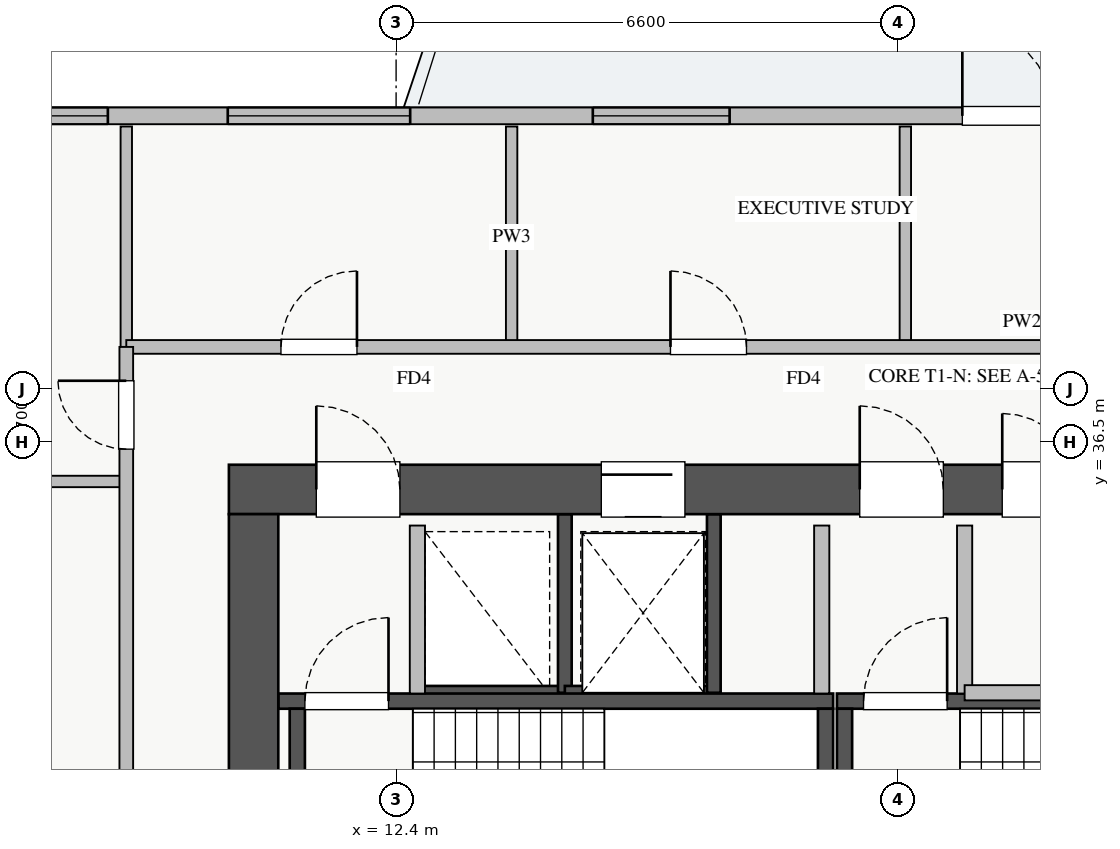
"""IFC4 building model, lengths in metres.
Left out: names, types, materials, properties, quantities, classifications, styles, units other than length and angle.
Written with IfcOpenShell. Run it as: python <this file> out.ifc"""

import sys

from ifc_helpers import new_model, si_unit, direction, frame, frame_2d, origin, place, context, subcontext, project, spatial, rectangle, extrude, source, transform, mapped, element, fill, save


model = new_model("IFC4")
c1 = context("Model", 3, precision=1e-05, world=origin(), true_north=direction((0.0, 1.0)))
c2 = subcontext(c1, "Body", "Model", "MODEL_VIEW")
j1 = project(units=[si_unit("LENGTHUNIT", "METRE"), si_unit("PLANEANGLEUNIT", "RADIAN")], contexts=[c1])
p1 = place(None, origin())
s1 = spatial("IfcSite", under=j1, at=p1, CompositionType="ELEMENT")
p2 = place(p1, origin())
s2 = spatial("IfcBuilding", under=s1, at=p2, CompositionType="ELEMENT")
p3 = place(p2, frame((0.0, 0.0, 116.5)))
s3 = spatial("IfcBuildingStorey", under=s2, at=p3, CompositionType="ELEMENT", Elevation=116.5)
p4 = place(p3, frame((12.68, 33.2, 0.0), z_axis=(0.0, 0.0, 1.0), x_axis=(1.0, 0.0, 0.0)))
e1 = element("IfcWall", 1, at=p4, inside=s3, PredefinedType="SHEAR", context=c2, shape_type="SweptSolid", body=[
    extrude(rectangle(XDim=1.94, YDim=0.18, at=frame_2d((0.97, 0.0))), origin(), (0.0, 0.0, 1.0), 3.07),
])
p5 = place(p3, frame((14.62, 33.2, 0.0), z_axis=(0.0, 0.0, 1.0), x_axis=(0.0, 1.0, 0.0)))
e2 = element("IfcWall", 2, at=p5, inside=s3, PredefinedType="SHEAR", context=c2, shape_type="SweptSolid", body=[
    extrude(rectangle(XDim=2.35, YDim=0.18, at=frame_2d((1.175, 0.0))), origin(), (0.0, 0.0, 1.0), 3.07),
])
p6 = place(p3, frame((14.62, 33.2, 0.0), z_axis=(0.0, 0.0, 1.0), x_axis=(1.0, 0.0, 0.0)))
e3 = element("IfcWall", 3, at=p6, inside=s3, PredefinedType="SHEAR", context=c2, shape_type="SweptSolid", body=[
    extrude(rectangle(XDim=1.96, YDim=0.18, at=frame_2d((0.98, 0.0))), origin(), (0.0, 0.0, 1.0), 3.07),
])
p7 = place(p3, frame((16.58, 33.2, 0.0), z_axis=(0.0, 0.0, 1.0), x_axis=(0.0, 1.0, 0.0)))
e4 = element("IfcWall", 4, at=p7, inside=s3, PredefinedType="SHEAR", context=c2, shape_type="SweptSolid", body=[
    extrude(rectangle(XDim=2.35, YDim=0.18, at=frame_2d((1.175, 0.0))), origin(), (0.0, 0.0, 1.0), 3.07),
])
p8 = place(p3, frame((10.85, 33.09, 0.0), z_axis=(0.0, 0.0, 1.0), x_axis=(1.0, 0.0, 0.0)))
e5 = element("IfcWall", 5, at=p8, inside=s3, PredefinedType="SHEAR", context=c2, shape_type="SweptSolid", body=[
    extrude(rectangle(XDim=7.3, YDim=0.2, at=frame_2d((3.65, 0.0))), origin(), (0.0, 0.0, 1.0), 3.25),
])
p9 = place(p8, frame((0.35, 0.0, 0.0)))
e6 = element("IfcOpeningElement", 6, at=p9, cuts=e5, PredefinedType="OPENING", context=c2, shape_type="SweptSolid", body=[
    extrude(rectangle(XDim=1.1, YDim=2.05, at=frame_2d((0.55, 1.025))), frame((0.0, 0.11, 0.0), z_axis=(0.0, -1.0, 0.0), x_axis=(1.0, 0.0, 0.0)), (0.0, 0.0, 1.0), 0.22),
])
for number, where, z_axis, x_axis in (
    (7, (11.1, 30.05, 0.0), (0.0, 0.0, 1.0), (0.0, 1.0, 0.0)),
    (8, (18.05, 30.05, 0.0), (0.0, 0.0, 1.0), (0.0, 1.0, 0.0)),
):
    element("IfcWall", number, at=place(p3, frame(where, z_axis=z_axis, x_axis=x_axis)), inside=s3, PredefinedType="SHEAR", context=c2, shape_type="SweptSolid", body=[
        extrude(rectangle(XDim=2.94, YDim=0.2, at=frame_2d((1.47, 0.0))), origin(), (0.0, 0.0, 1.0), 3.25),
    ])
p10 = place(p3, frame((18.2, 33.09, 0.0), z_axis=(0.0, 0.0, 1.0), x_axis=(1.0, 0.0, 0.0)))
e9 = element("IfcWall", 9, at=p10, inside=s3, PredefinedType="SHEAR", context=c2, shape_type="SweptSolid", body=[
    extrude(rectangle(XDim=7.15, YDim=0.2, at=frame_2d((3.575, 0.0))), origin(), (0.0, 0.0, 1.0), 3.25),
])
p11 = place(p10, frame((0.35, 0.0, 0.0)))
e10 = element("IfcOpeningElement", 10, at=p11, cuts=e9, PredefinedType="OPENING", context=c2, shape_type="SweptSolid", body=[
    extrude(rectangle(XDim=1.1, YDim=2.05, at=frame_2d((0.55, 1.025))), frame((0.0, 0.11, 0.0), z_axis=(0.0, -1.0, 0.0), x_axis=(1.0, 0.0, 0.0)), (0.0, 0.0, 1.0), 0.22),
])
p12 = place(p3, frame((18.3, 30.05, 0.0), z_axis=(0.0, 0.0, 1.0), x_axis=(0.0, 1.0, 0.0)))
e11 = element("IfcWall", 11, at=p12, inside=s3, PredefinedType="SHEAR", context=c2, shape_type="SweptSolid", body=[
    extrude(rectangle(XDim=2.94, YDim=0.2, at=frame_2d((1.47, 0.0))), origin(), (0.0, 0.0, 1.0), 3.25),
])
p13 = place(p3, frame((10.2, 35.875, 0.0), z_axis=(0.0, 0.0, 1.0), x_axis=(1.0, 0.0, 0.0)))
e12 = element("IfcWall", 12, at=p13, inside=s3, PredefinedType="SHEAR", context=c2, shape_type="SweptSolid", body=[
    extrude(rectangle(XDim=17.6, YDim=0.65, at=frame_2d((8.8, 0.0))), origin(), (0.0, 0.0, 1.0), 3.25),
])
p14 = place(p13, frame((1.15, 0.0, 0.0)))
e13 = element("IfcOpeningElement", 13, at=p14, cuts=e12, PredefinedType="OPENING", context=c2, shape_type="SweptSolid", body=[
    extrude(rectangle(XDim=1.1, YDim=2.05, at=frame_2d((0.55, 1.025))), frame((0.0, 0.335, 0.0), z_axis=(0.0, -1.0, 0.0), x_axis=(1.0, 0.0, 0.0)), (0.0, 0.0, 1.0), 0.67),
])
p15 = place(p13, frame((8.3, 0.0, 0.0)))
e14 = element("IfcOpeningElement", 14, at=p15, cuts=e12, PredefinedType="OPENING", context=c2, shape_type="SweptSolid", body=[
    extrude(rectangle(XDim=1.1, YDim=2.05, at=frame_2d((0.55, 1.025))), frame((0.0, 0.335, 0.0), z_axis=(0.0, -1.0, 0.0), x_axis=(1.0, 0.0, 0.0)), (0.0, 0.0, 1.0), 0.67),
])
p16 = place(p13, frame((4.9, 0.0, 0.0)))
e15 = element("IfcOpeningElement", 15, at=p16, cuts=e12, PredefinedType="OPENING", context=c2, shape_type="SweptSolid", body=[
    extrude(rectangle(XDim=1.1, YDim=2.05, at=frame_2d((0.55, 1.025))), frame((0.0, 0.335, 0.0), z_axis=(0.0, -1.0, 0.0), x_axis=(1.0, 0.0, 0.0)), (0.0, 0.0, 1.0), 0.67),
])
p17 = place(p13, frame((14.74, 0.0, 0.0)))
e16 = element("IfcOpeningElement", 16, at=p17, cuts=e12, PredefinedType="OPENING", context=c2, shape_type="SweptSolid", body=[
    extrude(rectangle(XDim=1.0, YDim=2.05, at=frame_2d((0.5, 1.025))), frame((0.0, 0.335, 0.0), z_axis=(0.0, -1.0, 0.0), x_axis=(1.0, 0.0, 0.0)), (0.0, 0.0, 1.0), 0.67),
])
p18 = place(p13, frame((10.175, 0.0, 0.0)))
e17 = element("IfcOpeningElement", 17, at=p18, cuts=e12, PredefinedType="OPENING", context=c2, shape_type="SweptSolid", body=[
    extrude(rectangle(XDim=1.0, YDim=2.05, at=frame_2d((0.5, 1.025))), frame((0.0, 0.335, 0.0), z_axis=(0.0, -1.0, 0.0), x_axis=(1.0, 0.0, 0.0)), (0.0, 0.0, 1.0), 0.67),
])
p19 = place(p13, frame((12.625, 0.0, 0.0)))
e18 = element("IfcOpeningElement", 18, at=p19, cuts=e12, PredefinedType="OPENING", context=c2, shape_type="SweptSolid", body=[
    extrude(rectangle(XDim=1.0, YDim=2.05, at=frame_2d((0.5, 1.025))), frame((0.0, 0.335, 0.0), z_axis=(0.0, -1.0, 0.0), x_axis=(1.0, 0.0, 0.0)), (0.0, 0.0, 1.0), 0.67),
])
p20 = place(p3, frame((10.525, 29.65, 0.0), z_axis=(0.0, 0.0, 1.0), x_axis=(0.0, 1.0, 0.0)))
e19 = element("IfcWall", 19, at=p20, inside=s3, PredefinedType="SHEAR", context=c2, shape_type="SweptSolid", body=[
    extrude(rectangle(XDim=5.9, YDim=0.65, at=frame_2d((2.95, 0.0))), origin(), (0.0, 0.0, 1.0), 3.25),
])
p21 = place(p3, frame((6.55, 40.79, 0.0), z_axis=(0.0, 0.0, 1.0), x_axis=(1.0, 0.0, 0.0)))
e20 = element("IfcWall", 20, at=p21, inside=s3, PredefinedType="STANDARD", context=c2, shape_type="SweptSolid", body=[
    extrude(rectangle(XDim=24.9, YDim=0.22, at=frame_2d((12.45, 0.0))), origin(), (0.0, 0.0, 1.0), 2.61),
])
p22 = place(p21, frame((13.3, 0.0, 0.0)))
e21 = element("IfcOpeningElement", 21, at=p22, cuts=e20, PredefinedType="OPENING", context=c2, shape_type="SweptSolid", body=[
    extrude(rectangle(XDim=1.2, YDim=2.1, at=frame_2d((0.6, 1.05))), frame((0.0, 0.12, 0.0), z_axis=(0.0, -1.0, 0.0), x_axis=(1.0, 0.0, 0.0)), (0.0, 0.0, 1.0), 0.24),
])
p23 = place(p21, frame((3.635, 0.0, 0.9)))
e22 = element("IfcOpeningElement", 22, at=p23, cuts=e20, PredefinedType="OPENING", context=c2, shape_type="SweptSolid", body=[
    extrude(rectangle(XDim=2.4, YDim=1.5, at=frame_2d((1.2, 0.75))), frame((0.0, 0.12, 0.0), z_axis=(0.0, -1.0, 0.0), x_axis=(1.0, 0.0, 0.0)), (0.0, 0.0, 1.0), 0.24),
])
p24 = place(p21, frame((8.438, 0.0, 0.9)))
e23 = element("IfcOpeningElement", 23, at=p24, cuts=e20, PredefinedType="OPENING", context=c2, shape_type="SweptSolid", body=[
    extrude(rectangle(XDim=1.8, YDim=1.45, at=frame_2d((0.9, 0.725))), frame((0.0, 0.12, 0.0), z_axis=(0.0, -1.0, 0.0), x_axis=(1.0, 0.0, 0.0)), (0.0, 0.0, 1.0), 0.24),
])
p25 = place(p21, frame((14.813, 0.0, 0.9)))
e24 = element("IfcOpeningElement", 24, at=p25, cuts=e20, PredefinedType="OPENING", context=c2, shape_type="SweptSolid", body=[
    extrude(rectangle(XDim=1.5, YDim=1.45, at=frame_2d((0.75, 0.725))), frame((0.0, 0.12, 0.0), z_axis=(0.0, -1.0, 0.0), x_axis=(1.0, 0.0, 0.0)), (0.0, 0.0, 1.0), 0.24),
])
p26 = place(p21, frame((20.738, 0.0, 0.9)))
e25 = element("IfcOpeningElement", 25, at=p26, cuts=e20, PredefinedType="OPENING", context=c2, shape_type="SweptSolid", body=[
    extrude(rectangle(XDim=2.1, YDim=1.48, at=frame_2d((1.05, 0.74))), frame((0.0, 0.12, 0.0), z_axis=(0.0, -1.0, 0.0), x_axis=(1.0, 0.0, 0.0)), (0.0, 0.0, 1.0), 0.24),
])
p27 = place(p21, frame((0.258, 0.0, 0.9)))
e26 = element("IfcOpeningElement", 26, at=p27, cuts=e20, PredefinedType="OPENING", context=c2, shape_type="SweptSolid", body=[
    extrude(rectangle(XDim=1.8, YDim=1.5, at=frame_2d((0.9, 0.75))), frame((0.0, 0.12, 0.0), z_axis=(0.0, -1.0, 0.0), x_axis=(1.0, 0.0, 0.0)), (0.0, 0.0, 1.0), 0.24),
])
for number, where, z_axis, x_axis in (
    (27, (12.68, 33.19, 0.0), (0.0, 0.0, 1.0), (0.0, 1.0, 0.0)),
    (28, (18.0, 33.19, 0.0), (0.0, 0.0, 1.0), (0.0, 1.0, 0.0)),
    (29, (19.88, 33.19, 0.0), (0.0, 0.0, 1.0), (0.0, 1.0, 0.0)),
):
    element("IfcWall", number, at=place(p3, frame(where, z_axis=z_axis, x_axis=x_axis)), inside=s3, PredefinedType="PARTITIONING", context=c2, shape_type="SweptSolid", body=[
        extrude(rectangle(XDim=2.21, YDim=0.2, at=frame_2d((1.105, 0.0))), origin(), (0.0, 0.0, 1.0), 3.07),
    ])
p28 = place(p3, frame((19.88, 33.2, 0.0), z_axis=(0.0, 0.0, 1.0), x_axis=(1.0, 0.0, 0.0)))
e30 = element("IfcWall", 30, at=p28, inside=s3, PredefinedType="PARTITIONING", context=c2, shape_type="SweptSolid", body=[
    extrude(rectangle(XDim=1.87, YDim=0.2, at=frame_2d((0.935, 0.0))), origin(), (0.0, 0.0, 1.0), 3.07),
])
p29 = place(p3, frame((13.92, 37.75, 0.0), z_axis=(0.0, 0.0, 1.0), x_axis=(0.0, 1.0, 0.0)))
e31 = element("IfcWall", 31, at=p29, inside=s3, PredefinedType="PARTITIONING", context=c2, shape_type="SweptSolid", body=[
    extrude(rectangle(XDim=2.9, YDim=0.15, at=frame_2d((1.45, 0.0))), origin(), (0.0, 0.0, 1.0), 3.07),
])
p30 = place(p3, frame((19.1, 37.75, 0.0), z_axis=(0.0, 0.0, 1.0), x_axis=(0.0, 1.0, 0.0)))
e32 = element("IfcWall", 32, at=p30, inside=s3, PredefinedType="PARTITIONING", context=c2, shape_type="SweptSolid", body=[
    extrude(rectangle(XDim=2.9, YDim=0.15, at=frame_2d((1.45, 0.0))), origin(), (0.0, 0.0, 1.0), 2.815),
])
p31 = place(p3, frame((8.85, 37.75, 0.0), z_axis=(0.0, 0.0, 1.0), x_axis=(0.0, 1.0, 0.0)))
e33 = element("IfcWall", 33, at=p31, inside=s3, PredefinedType="PARTITIONING", context=c2, shape_type="SweptSolid", body=[
    extrude(rectangle(XDim=2.9, YDim=0.15, at=frame_2d((1.45, 0.0))), origin(), (0.0, 0.0, 1.0), 3.07),
])
p32 = place(p3, frame((8.85, 37.75, 0.0), z_axis=(0.0, 0.0, 1.0), x_axis=(1.0, 0.0, 0.0)))
e34 = element("IfcWall", 34, at=p32, inside=s3, PredefinedType="PARTITIONING", context=c2, shape_type="SweptSolid", body=[
    extrude(rectangle(XDim=23.57, YDim=0.18, at=frame_2d((11.785, 0.0))), origin(), (0.0, 0.0, 1.0), 3.07),
])
p33 = place(p32, frame((2.035, 0.0, 0.0)))
e35 = element("IfcOpeningElement", 35, at=p33, cuts=e34, PredefinedType="OPENING", context=c2, shape_type="SweptSolid", body=[
    extrude(rectangle(XDim=1.0, YDim=2.05, at=frame_2d((0.5, 1.025))), frame((0.0, 0.1, 0.0), z_axis=(0.0, -1.0, 0.0), x_axis=(1.0, 0.0, 0.0)), (0.0, 0.0, 1.0), 0.2),
])
p34 = place(p32, frame((7.16, 0.0, 0.0)))
e36 = element("IfcOpeningElement", 36, at=p34, cuts=e34, PredefinedType="OPENING", context=c2, shape_type="SweptSolid", body=[
    extrude(rectangle(XDim=1.0, YDim=2.05, at=frame_2d((0.5, 1.025))), frame((0.0, 0.1, 0.0), z_axis=(0.0, -1.0, 0.0), x_axis=(1.0, 0.0, 0.0)), (0.0, 0.0, 1.0), 0.2),
])
p35 = place(p32, frame((13.3, 0.0, 0.0)))
e37 = element("IfcOpeningElement", 37, at=p35, cuts=e34, PredefinedType="OPENING", context=c2, shape_type="SweptSolid", body=[
    extrude(rectangle(XDim=1.0, YDim=2.05, at=frame_2d((0.5, 1.025))), frame((0.0, 0.1, 0.0), z_axis=(0.0, -1.0, 0.0), x_axis=(1.0, 0.0, 0.0)), (0.0, 0.0, 1.0), 0.2),
])
p36 = place(p32, frame((19.74, 0.0, 0.0)))
e38 = element("IfcOpeningElement", 38, at=p36, cuts=e34, PredefinedType="OPENING", context=c2, shape_type="SweptSolid", body=[
    extrude(rectangle(XDim=1.0, YDim=2.05, at=frame_2d((0.5, 1.025))), frame((0.0, 0.1, 0.0), z_axis=(0.0, -1.0, 0.0), x_axis=(1.0, 0.0, 0.0)), (0.0, 0.0, 1.0), 0.2),
])
p37 = place(p3, frame((1.35, 35.98, 0.0), z_axis=(0.0, 0.0, 1.0), x_axis=(1.0, 0.0, 0.0)))
e39 = element("IfcWall", 39, at=p37, inside=s3, PredefinedType="PARTITIONING", context=c2, shape_type="SweptSolid", body=[
    extrude(rectangle(XDim=7.5, YDim=0.15, at=frame_2d((3.75, 0.0))), origin(), (0.0, 0.0, 1.0), 3.07),
])
p38 = place(p3, frame((8.85, 8.25, 0.0), z_axis=(0.0, 0.0, 1.0), x_axis=(0.0, 1.0, 0.0)))
e40 = element("IfcWall", 40, at=p38, inside=s3, PredefinedType="PARTITIONING", context=c2, shape_type="SweptSolid", body=[
    extrude(rectangle(XDim=29.5, YDim=0.18, at=frame_2d((14.75, 0.0))), origin(), (0.0, 0.0, 1.0), 3.07),
])
p39 = place(p38, frame((28.155, 0.0, 0.0)))
e41 = element("IfcOpeningElement", 41, at=p39, cuts=e40, PredefinedType="OPENING", context=c2, shape_type="SweptSolid", body=[
    extrude(rectangle(XDim=0.9, YDim=2.05, at=frame_2d((0.45, 1.025))), frame((0.0, 0.1, 0.0), z_axis=(0.0, -1.0, 0.0), x_axis=(1.0, 0.0, 0.0)), (0.0, 0.0, 1.0), 0.2),
])
p40 = place(p38, frame((0.27, 0.0, 0.0)))
e42 = element("IfcOpeningElement", 42, at=p40, cuts=e40, PredefinedType="OPENING", context=c2, shape_type="SweptSolid", body=[
    extrude(rectangle(XDim=0.9, YDim=2.05, at=frame_2d((0.45, 1.025))), frame((0.0, 0.1, 0.0), z_axis=(0.0, -1.0, 0.0), x_axis=(1.0, 0.0, 0.0)), (0.0, 0.0, 1.0), 0.2),
])
p41 = place(p38, frame((7.255, 0.0, 0.0)))
e43 = element("IfcOpeningElement", 43, at=p41, cuts=e40, PredefinedType="OPENING", context=c2, shape_type="SweptSolid", body=[
    extrude(rectangle(XDim=1.0, YDim=2.05, at=frame_2d((0.5, 1.025))), frame((0.0, 0.1, 0.0), z_axis=(0.0, -1.0, 0.0), x_axis=(1.0, 0.0, 0.0)), (0.0, 0.0, 1.0), 0.2),
])
p42 = place(p38, frame((16.675, 0.0, 0.0)))
e44 = element("IfcOpeningElement", 44, at=p42, cuts=e40, PredefinedType="OPENING", context=c2, shape_type="SweptSolid", body=[
    extrude(rectangle(XDim=1.0, YDim=2.05, at=frame_2d((0.5, 1.025))), frame((0.0, 0.1, 0.0), z_axis=(0.0, -1.0, 0.0), x_axis=(1.0, 0.0, 0.0)), (0.0, 0.0, 1.0), 0.2),
])
m1 = source(origin(), c2, "Body", "SweptSolid", [
    extrude(rectangle(XDim=1.2, YDim=2.1, at=frame_2d((0.6, 1.05))), frame((0.0, 0.025, 0.0), z_axis=(0.0, -1.0, 0.0), x_axis=(1.0, 0.0, 0.0)), (0.0, 0.0, 1.0), 0.05),
])
p43 = place(p22, origin())
e45 = element("IfcDoor", 45, at=p43, inside=s3, OperationType="SINGLE_SWING_LEFT", PredefinedType="DOOR", context=c2, shape_type="MappedRepresentation", body=[
    mapped(m1, transform((0.0, 0.0, 0.0), x_axis=(1.0, 0.0, 0.0), y_axis=(0.0, 1.0, 0.0), z_axis=(0.0, 0.0, 1.0), scale=1.0)),
])
fill(e21, e45)
m2 = source(origin(), c2, "Body", "SweptSolid", [
    extrude(rectangle(XDim=2.4, YDim=1.5, at=frame_2d((1.2, 0.75))), frame((0.0, 0.03, 0.0), z_axis=(0.0, -1.0, 0.0), x_axis=(1.0, 0.0, 0.0)), (0.0, 0.0, 1.0), 0.06),
])
p44 = place(p23, origin())
e46 = element("IfcWindow", 46, at=p44, inside=s3, PartitioningType="TRIPLE_PANEL_VERTICAL", PredefinedType="WINDOW", context=c2, shape_type="MappedRepresentation", body=[
    mapped(m2, transform((0.0, 0.0, 0.0), x_axis=(1.0, 0.0, 0.0), y_axis=(0.0, 1.0, 0.0), z_axis=(0.0, 0.0, 1.0), scale=1.0)),
])
fill(e22, e46)
m3 = source(origin(), c2, "Body", "SweptSolid", [
    extrude(rectangle(XDim=1.8, YDim=1.45, at=frame_2d((0.9, 0.725))), frame((0.0, 0.03, 0.0), z_axis=(0.0, -1.0, 0.0), x_axis=(1.0, 0.0, 0.0)), (0.0, 0.0, 1.0), 0.06),
])
p45 = place(p24, origin())
e47 = element("IfcWindow", 47, at=p45, inside=s3, PartitioningType="DOUBLE_PANEL_VERTICAL", PredefinedType="WINDOW", context=c2, shape_type="MappedRepresentation", body=[
    mapped(m3, transform((0.0, 0.0, 0.0), x_axis=(1.0, 0.0, 0.0), y_axis=(0.0, 1.0, 0.0), z_axis=(0.0, 0.0, 1.0), scale=1.0)),
])
fill(e23, e47)
m4 = source(origin(), c2, "Body", "SweptSolid", [
    extrude(rectangle(XDim=1.1, YDim=2.05, at=frame_2d((0.55, 1.025))), frame((0.0, 0.025, 0.0), z_axis=(0.0, -1.0, 0.0), x_axis=(1.0, 0.0, 0.0)), (0.0, 0.0, 1.0), 0.05),
])
p46 = place(p14, origin())
e48 = element("IfcDoor", 48, at=p46, inside=s3, OperationType="SINGLE_SWING_LEFT", PredefinedType="DOOR", context=c2, shape_type="MappedRepresentation", body=[
    mapped(m4, transform((0.0, 0.0, 0.0), x_axis=(1.0, 0.0, 0.0), y_axis=(0.0, 1.0, 0.0), z_axis=(0.0, 0.0, 1.0), scale=1.0)),
])
fill(e13, e48)
p47 = place(p9, origin())
e49 = element("IfcDoor", 49, at=p47, inside=s3, OperationType="SINGLE_SWING_RIGHT", PredefinedType="DOOR", context=c2, shape_type="MappedRepresentation", body=[
    mapped(m4, transform((0.0, 0.0, 0.0), x_axis=(1.0, 0.0, 0.0), y_axis=(0.0, 1.0, 0.0), z_axis=(0.0, 0.0, 1.0), scale=1.0)),
])
fill(e6, e49)
p48 = place(p15, origin())
e50 = element("IfcDoor", 50, at=p48, inside=s3, OperationType="SINGLE_SWING_LEFT", PredefinedType="DOOR", context=c2, shape_type="MappedRepresentation", body=[
    mapped(m4, transform((0.0, 0.0, 0.0), x_axis=(1.0, 0.0, 0.0), y_axis=(0.0, 1.0, 0.0), z_axis=(0.0, 0.0, 1.0), scale=1.0)),
])
fill(e14, e50)
p49 = place(p11, origin())
e51 = element("IfcDoor", 51, at=p49, inside=s3, OperationType="SINGLE_SWING_RIGHT", PredefinedType="DOOR", context=c2, shape_type="MappedRepresentation", body=[
    mapped(m4, transform((0.0, 0.0, 0.0), x_axis=(1.0, 0.0, 0.0), y_axis=(0.0, 1.0, 0.0), z_axis=(0.0, 0.0, 1.0), scale=1.0)),
])
fill(e10, e51)
p50 = place(p16, origin())
e52 = element("IfcDoor", 52, at=p50, inside=s3, OperationType="SLIDING_TO_LEFT", PredefinedType="DOOR", context=c2, shape_type="MappedRepresentation", body=[
    mapped(m4, transform((0.0, 0.0, 0.0), x_axis=(1.0, 0.0, 0.0), y_axis=(0.0, 1.0, 0.0), z_axis=(0.0, 0.0, 1.0), scale=1.0)),
])
fill(e15, e52)
m5 = source(origin(), c2, "Body", "SweptSolid", [
    extrude(rectangle(XDim=1.0, YDim=2.05, at=frame_2d((0.5, 1.025))), frame((0.0, 0.025, 0.0), z_axis=(0.0, -1.0, 0.0), x_axis=(1.0, 0.0, 0.0)), (0.0, 0.0, 1.0), 0.05),
])
p51 = place(p18, origin())
e53 = element("IfcDoor", 53, at=p51, inside=s3, OperationType="SINGLE_SWING_LEFT", PredefinedType="DOOR", context=c2, shape_type="MappedRepresentation", body=[
    mapped(m5, transform((0.0, 0.0, 0.0), x_axis=(1.0, 0.0, 0.0), y_axis=(0.0, 1.0, 0.0), z_axis=(0.0, 0.0, 1.0), scale=1.0)),
])
fill(e17, e53)
p52 = place(p33, origin())
e54 = element("IfcDoor", 54, at=p52, inside=s3, OperationType="SINGLE_SWING_RIGHT", PredefinedType="DOOR", context=c2, shape_type="MappedRepresentation", body=[
    mapped(m5, transform((0.0, 0.0, 0.0), x_axis=(1.0, 0.0, 0.0), y_axis=(0.0, 1.0, 0.0), z_axis=(0.0, 0.0, 1.0), scale=1.0)),
])
fill(e35, e54)
p53 = place(p34, origin())
e55 = element("IfcDoor", 55, at=p53, inside=s3, OperationType="SINGLE_SWING_LEFT", PredefinedType="DOOR", context=c2, shape_type="MappedRepresentation", body=[
    mapped(m5, transform((0.0, 0.0, 0.0), x_axis=(1.0, 0.0, 0.0), y_axis=(0.0, 1.0, 0.0), z_axis=(0.0, 0.0, 1.0), scale=1.0)),
])
fill(e36, e55)
m6 = source(origin(), c2, "Body", "SweptSolid", [
    extrude(rectangle(XDim=0.9, YDim=2.05, at=frame_2d((0.45, 1.025))), frame((0.0, 0.025, 0.0), z_axis=(0.0, -1.0, 0.0), x_axis=(1.0, 0.0, 0.0)), (0.0, 0.0, 1.0), 0.05),
])
p54 = place(p39, origin())
e56 = element("IfcDoor", 56, at=p54, inside=s3, OperationType="SINGLE_SWING_RIGHT", PredefinedType="DOOR", context=c2, shape_type="MappedRepresentation", body=[
    mapped(m6, transform((0.0, 0.0, 0.0), x_axis=(1.0, 0.0, 0.0), y_axis=(0.0, 1.0, 0.0), z_axis=(0.0, 0.0, 1.0), scale=1.0)),
])
fill(e41, e56)
m7 = source(origin(), c2, "Body", "SweptSolid", [
    extrude(rectangle(XDim=1.8, YDim=1.5, at=frame_2d((0.9, 0.75))), frame((0.0, 0.03, 0.0), z_axis=(0.0, -1.0, 0.0), x_axis=(1.0, 0.0, 0.0)), (0.0, 0.0, 1.0), 0.06),
])
p55 = place(p27, origin())
e57 = element("IfcWindow", 57, at=p55, inside=s3, PartitioningType="DOUBLE_PANEL_VERTICAL", PredefinedType="WINDOW", context=c2, shape_type="MappedRepresentation", body=[
    mapped(m7, transform((0.0, 0.0, 0.0), x_axis=(1.0, 0.0, 0.0), y_axis=(0.0, 1.0, 0.0), z_axis=(0.0, 0.0, 1.0), scale=1.0)),
])
fill(e26, e57)
save(model, sys.argv[1])
